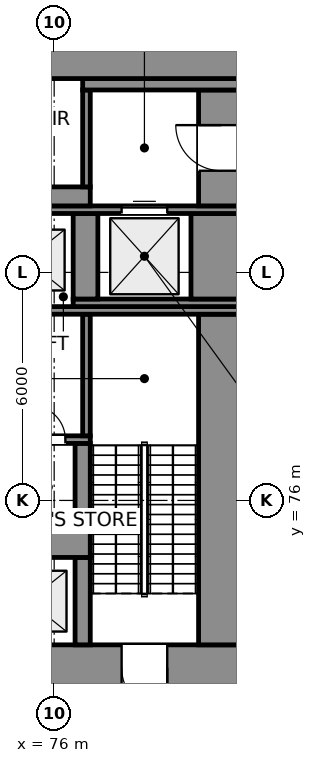
"""IFC4 building model, lengths in metres.
Left out: names, types, materials, properties, quantities, classifications, styles, units other than length and angle.
Written with IfcOpenShell. Run it as: python <this file> out.ifc"""

import sys

from ifc_helpers import new_model, si_unit, direction, frame, frame_2d, origin, place, context, subcontext, project, spatial, rectangle, extrude, element, fill, save


model = new_model("IFC4")
c1 = context("Model", 3, precision=1e-05, world=origin(), true_north=direction((0.0, 1.0)))
c2 = subcontext(c1, "Body", "Model", "MODEL_VIEW")
j1 = project(units=[si_unit("LENGTHUNIT", "METRE"), si_unit("PLANEANGLEUNIT", "RADIAN")], contexts=[c1])
p1 = place(None, origin())
s1 = spatial("IfcSite", under=j1, at=p1, CompositionType="ELEMENT")
p2 = place(p1, origin())
s2 = spatial("IfcBuilding", under=s1, at=p2, CompositionType="ELEMENT")
p3 = place(p2, frame((0.0, 0.0, 9.0)))
s3 = spatial("IfcBuildingStorey", under=s2, at=p3, CompositionType="ELEMENT", Elevation=9.0)
p4 = place(p3, frame((59.0, 71.6, 0.0), z_axis=(0.0, 0.0, 1.0), x_axis=(1.0, 0.0, 0.0)))
e1 = element("IfcWall", 1, at=p4, inside=s3, PredefinedType="SHEAR", context=c2, shape_type="SweptSolid", body=[
    extrude(rectangle(XDim=22.0, YDim=1.2, at=frame_2d((11.0, 0.0))), origin(), (0.0, 0.0, 1.0), 6.0),
])
p5 = place(p4, frame((2.025, 0.0, 0.0)))
e2 = element("IfcOpeningElement", 2, at=p5, cuts=e1, PredefinedType="OPENING", context=c2, shape_type="SweptSolid", body=[
    extrude(rectangle(XDim=1.2, YDim=2.1, at=frame_2d((0.6, 1.05))), frame((0.0, 0.61, 0.0), z_axis=(0.0, -1.0, 0.0), x_axis=(1.0, 0.0, 0.0)), (0.0, 0.0, 1.0), 1.22),
])
p6 = place(p4, frame((18.775, 0.0, 0.0)))
e3 = element("IfcOpeningElement", 3, at=p6, cuts=e1, PredefinedType="OPENING", context=c2, shape_type="SweptSolid", body=[
    extrude(rectangle(XDim=1.2, YDim=2.1, at=frame_2d((0.6, 1.05))), frame((0.0, 0.61, 0.0), z_axis=(0.0, -1.0, 0.0), x_axis=(1.0, 0.0, 0.0)), (0.0, 0.0, 1.0), 1.22),
])
p7 = place(p4, frame((10.0, 0.0, 0.0)))
e4 = element("IfcOpeningElement", 4, at=p7, cuts=e1, PredefinedType="OPENING", context=c2, shape_type="SweptSolid", body=[
    extrude(rectangle(XDim=2.0, YDim=2.1, at=frame_2d((1.0, 1.05))), frame((0.0, 0.61, 0.0), z_axis=(0.0, -1.0, 0.0), x_axis=(1.0, 0.0, 0.0)), (0.0, 0.0, 1.0), 1.22),
])
p8 = place(p4, frame((4.925, 0.0, 0.0)))
e5 = element("IfcOpeningElement", 5, at=p8, cuts=e1, PredefinedType="OPENING", context=c2, shape_type="SweptSolid", body=[
    extrude(rectangle(XDim=1.1, YDim=2.1, at=frame_2d((0.55, 1.05))), frame((0.0, 0.61, 0.0), z_axis=(0.0, -1.0, 0.0), x_axis=(1.0, 0.0, 0.0)), (0.0, 0.0, 1.0), 1.22),
])
p9 = place(p4, frame((7.575, 0.0, 0.0)))
e6 = element("IfcOpeningElement", 6, at=p9, cuts=e1, PredefinedType="OPENING", context=c2, shape_type="SweptSolid", body=[
    extrude(rectangle(XDim=1.1, YDim=2.1, at=frame_2d((0.55, 1.05))), frame((0.0, 0.61, 0.0), z_axis=(0.0, -1.0, 0.0), x_axis=(1.0, 0.0, 0.0)), (0.0, 0.0, 1.0), 1.22),
])
p10 = place(p4, frame((13.125, 0.0, 0.0)))
e7 = element("IfcOpeningElement", 7, at=p10, cuts=e1, PredefinedType="OPENING", context=c2, shape_type="SweptSolid", body=[
    extrude(rectangle(XDim=1.1, YDim=2.1, at=frame_2d((0.55, 1.05))), frame((0.0, 0.61, 0.0), z_axis=(0.0, -1.0, 0.0), x_axis=(1.0, 0.0, 0.0)), (0.0, 0.0, 1.0), 1.22),
])
p11 = place(p4, frame((15.775, 0.0, 0.0)))
e8 = element("IfcOpeningElement", 8, at=p11, cuts=e1, PredefinedType="OPENING", context=c2, shape_type="SweptSolid", body=[
    extrude(rectangle(XDim=1.1, YDim=2.1, at=frame_2d((0.55, 1.05))), frame((0.0, 0.61, 0.0), z_axis=(0.0, -1.0, 0.0), x_axis=(1.0, 0.0, 0.0)), (0.0, 0.0, 1.0), 1.22),
])
p12 = place(p3, frame((76.75, 72.2, 0.0), z_axis=(0.0, 0.0, 1.0), x_axis=(0.0, 1.0, 0.0)))
e9 = element("IfcWall", 9, at=p12, inside=s3, PredefinedType="SHEAR", context=c2, shape_type="SweptSolid", body=[
    extrude(rectangle(XDim=2.3, YDim=0.4, at=frame_2d((1.15, 0.0))), origin(), (0.0, 0.0, 1.0), 6.0),
])
p13 = place(p3, frame((80.4, 72.2, 0.0), z_axis=(0.0, 0.0, 1.0), x_axis=(0.0, 1.0, 0.0)))
e10 = element("IfcWall", 10, at=p13, inside=s3, PredefinedType="SHEAR", context=c2, shape_type="SweptSolid", body=[
    extrude(rectangle(XDim=8.7, YDim=1.2, at=frame_2d((4.35, 0.0))), origin(), (0.0, 0.0, 1.0), 6.0),
])
p14 = place(p3, frame((71.25, 74.85, 0.0), z_axis=(0.0, 0.0, 1.0), x_axis=(1.0, 0.0, 0.0)))
e11 = element("IfcWall", 11, at=p14, inside=s3, PredefinedType="SHEAR", context=c2, shape_type="SweptSolid", body=[
    extrude(rectangle(XDim=5.7, YDim=0.7, at=frame_2d((2.85, 0.0))), origin(), (0.0, 0.0, 1.0), 6.0),
])
p15 = place(p3, frame((76.75, 75.2, 0.0), z_axis=(0.0, 0.0, 1.0), x_axis=(0.0, 1.0, 0.0)))
e12 = element("IfcWall", 12, at=p15, inside=s3, PredefinedType="SHEAR", context=c2, shape_type="SweptSolid", body=[
    extrude(rectangle(XDim=2.3, YDim=0.4, at=frame_2d((1.15, 0.0))), origin(), (0.0, 0.0, 1.0), 6.0),
])
p16 = place(p3, frame((71.25, 77.6, 0.0), z_axis=(0.0, 0.0, 1.0), x_axis=(1.0, 0.0, 0.0)))
e13 = element("IfcWall", 13, at=p16, inside=s3, PredefinedType="SHEAR", context=c2, shape_type="SweptSolid", body=[
    extrude(rectangle(XDim=5.7, YDim=0.2, at=frame_2d((2.85, 0.0))), origin(), (0.0, 0.0, 1.0), 6.0),
])
p17 = place(p16, frame((0.455, 0.0, 0.0)))
e14 = element("IfcOpeningElement", 14, at=p17, cuts=e13, PredefinedType="OPENING", context=c2, shape_type="SweptSolid", body=[
    extrude(rectangle(XDim=0.9, YDim=2.1, at=frame_2d((0.45, 1.05))), frame((0.0, 0.11, 0.0), z_axis=(0.0, -1.0, 0.0), x_axis=(1.0, 0.0, 0.0)), (0.0, 0.0, 1.0), 0.22),
])
p18 = place(p16, frame((2.3, 0.0, 0.0)))
e15 = element("IfcOpeningElement", 15, at=p18, cuts=e13, PredefinedType="OPENING", context=c2, shape_type="SweptSolid", body=[
    extrude(rectangle(XDim=0.9, YDim=2.1, at=frame_2d((0.45, 1.05))), frame((0.0, 0.11, 0.0), z_axis=(0.0, -1.0, 0.0), x_axis=(1.0, 0.0, 0.0)), (0.0, 0.0, 1.0), 0.22),
])
p19 = place(p16, frame((4.145, 0.0, 0.0)))
e16 = element("IfcOpeningElement", 16, at=p19, cuts=e13, PredefinedType="OPENING", context=c2, shape_type="SweptSolid", body=[
    extrude(rectangle(XDim=0.9, YDim=2.1, at=frame_2d((0.45, 1.05))), frame((0.0, 0.11, 0.0), z_axis=(0.0, -1.0, 0.0), x_axis=(1.0, 0.0, 0.0)), (0.0, 0.0, 1.0), 0.22),
])
p20 = place(p3, frame((76.85, 77.7, 0.0), z_axis=(0.0, 0.0, 1.0), x_axis=(0.0, 1.0, 0.0)))
e17 = element("IfcWall", 17, at=p20, inside=s3, PredefinedType="SHEAR", context=c2, shape_type="SweptSolid", body=[
    extrude(rectangle(XDim=3.2, YDim=0.2, at=frame_2d((1.6, 0.0))), origin(), (0.0, 0.0, 1.0), 6.0),
])
p21 = place(p3, frame((59.0, 81.0, 0.0), z_axis=(0.0, 0.0, 1.0), x_axis=(1.0, 0.0, 0.0)))
e18 = element("IfcWall", 18, at=p21, inside=s3, PredefinedType="SHEAR", context=c2, shape_type="SweptSolid", body=[
    extrude(rectangle(XDim=22.0, YDim=0.2, at=frame_2d((11.0, 0.0))), origin(), (0.0, 0.0, 1.0), 6.0),
])
p22 = place(p21, frame((15.725, 0.0, 0.0)))
e19 = element("IfcOpeningElement", 19, at=p22, cuts=e18, PredefinedType="OPENING", context=c2, shape_type="SweptSolid", body=[
    extrude(rectangle(XDim=1.1, YDim=2.1, at=frame_2d((0.55, 1.05))), frame((0.0, 0.11, 0.0), z_axis=(0.0, -1.0, 0.0), x_axis=(1.0, 0.0, 0.0)), (0.0, 0.0, 1.0), 0.22),
])
p23 = place(p3, frame((76.5, 81.2, 0.0), z_axis=(0.0, 0.0, 1.0), x_axis=(1.0, 0.0, 0.0)))
e20 = element("IfcWall", 20, at=p23, inside=s3, PredefinedType="SHEAR", context=c2, shape_type="SweptSolid", body=[
    extrude(rectangle(XDim=4.5, YDim=0.2, at=frame_2d((2.25, 0.0))), origin(), (0.0, 0.0, 1.0), 6.0),
])
p24 = place(p3, frame((76.825, 81.3, 0.0), z_axis=(0.0, 0.0, 1.0), x_axis=(0.0, 1.0, 0.0)))
e21 = element("IfcWall", 21, at=p24, inside=s3, PredefinedType="SHEAR", context=c2, shape_type="SweptSolid", body=[
    extrude(rectangle(XDim=2.25, YDim=0.65, at=frame_2d((1.125, 0.0))), origin(), (0.0, 0.0, 1.0), 6.0),
])
p25 = place(p3, frame((80.3, 81.3, 0.0), z_axis=(0.0, 0.0, 1.0), x_axis=(0.0, 1.0, 0.0)))
e22 = element("IfcWall", 22, at=p25, inside=s3, PredefinedType="SHEAR", context=c2, shape_type="SweptSolid", body=[
    extrude(rectangle(XDim=2.25, YDim=1.4, at=frame_2d((1.125, 0.0))), origin(), (0.0, 0.0, 1.0), 6.0),
])
p26 = place(p3, frame((59.0, 83.65, 0.0), z_axis=(0.0, 0.0, 1.0), x_axis=(1.0, 0.0, 0.0)))
e23 = element("IfcWall", 23, at=p26, inside=s3, PredefinedType="SHEAR", context=c2, shape_type="SweptSolid", body=[
    extrude(rectangle(XDim=22.0, YDim=0.2, at=frame_2d((11.0, 0.0))), origin(), (0.0, 0.0, 1.0), 6.0),
])
p27 = place(p26, frame((5.125, 0.0, 0.0)))
e24 = element("IfcOpeningElement", 24, at=p27, cuts=e23, PredefinedType="OPENING", context=c2, shape_type="SweptSolid", body=[
    extrude(rectangle(XDim=1.1, YDim=2.1, at=frame_2d((0.55, 1.05))), frame((0.0, 0.11, 0.0), z_axis=(0.0, -1.0, 0.0), x_axis=(1.0, 0.0, 0.0)), (0.0, 0.0, 1.0), 0.22),
])
p28 = place(p26, frame((7.65, 0.0, 0.0)))
e25 = element("IfcOpeningElement", 25, at=p28, cuts=e23, PredefinedType="OPENING", context=c2, shape_type="SweptSolid", body=[
    extrude(rectangle(XDim=1.1, YDim=2.1, at=frame_2d((0.55, 1.05))), frame((0.0, 0.11, 0.0), z_axis=(0.0, -1.0, 0.0), x_axis=(1.0, 0.0, 0.0)), (0.0, 0.0, 1.0), 0.22),
])
p29 = place(p26, frame((18.775, 0.0, 0.0)))
e26 = element("IfcOpeningElement", 26, at=p29, cuts=e23, PredefinedType="OPENING", context=c2, shape_type="SweptSolid", body=[
    extrude(rectangle(XDim=1.2, YDim=2.1, at=frame_2d((0.6, 1.05))), frame((0.0, 0.11, 0.0), z_axis=(0.0, -1.0, 0.0), x_axis=(1.0, 0.0, 0.0)), (0.0, 0.0, 1.0), 0.22),
])
p30 = place(p26, frame((2.075, 0.0, 0.0)))
e27 = element("IfcOpeningElement", 27, at=p30, cuts=e23, PredefinedType="OPENING", context=c2, shape_type="SweptSolid", body=[
    extrude(rectangle(XDim=1.1, YDim=2.1, at=frame_2d((0.55, 1.05))), frame((0.0, 0.11, 0.0), z_axis=(0.0, -1.0, 0.0), x_axis=(1.0, 0.0, 0.0)), (0.0, 0.0, 1.0), 0.22),
])
p31 = place(p3, frame((67.85, 84.0, 0.0), z_axis=(0.0, 0.0, 1.0), x_axis=(1.0, 0.0, 0.0)))
e28 = element("IfcWall", 28, at=p31, inside=s3, PredefinedType="SHEAR", context=c2, shape_type="SweptSolid", body=[
    extrude(rectangle(XDim=9.1, YDim=0.5, at=frame_2d((4.55, 0.0))), origin(), (0.0, 0.0, 1.0), 6.0),
])
p32 = place(p3, frame((80.4, 83.75, 0.0), z_axis=(0.0, 0.0, 1.0), x_axis=(0.0, 1.0, 0.0)))
e29 = element("IfcWall", 29, at=p32, inside=s3, PredefinedType="SHEAR", context=c2, shape_type="SweptSolid", body=[
    extrude(rectangle(XDim=3.05, YDim=1.2, at=frame_2d((1.525, 0.0))), origin(), (0.0, 0.0, 1.0), 6.0),
])
p33 = place(p32, frame((0.925, 0.0, 0.0)))
e30 = element("IfcOpeningElement", 30, at=p33, cuts=e29, PredefinedType="OPENING", context=c2, shape_type="SweptSolid", body=[
    extrude(rectangle(XDim=1.2, YDim=2.1, at=frame_2d((0.6, 1.05))), frame((0.0, 0.61, 0.0), z_axis=(0.0, -1.0, 0.0), x_axis=(1.0, 0.0, 0.0)), (0.0, 0.0, 1.0), 1.22),
])
p34 = place(p3, frame((76.85, 84.25, 0.0), z_axis=(0.0, 0.0, 1.0), x_axis=(0.0, 1.0, 0.0)))
e31 = element("IfcWall", 31, at=p34, inside=s3, PredefinedType="SHEAR", context=c2, shape_type="SweptSolid", body=[
    extrude(rectangle(XDim=2.55, YDim=0.2, at=frame_2d((1.275, 0.0))), origin(), (0.0, 0.0, 1.0), 6.0),
])
p35 = place(p3, frame((76.75, 86.95, 0.0), z_axis=(0.0, 0.0, 1.0), x_axis=(1.0, 0.0, 0.0)))
e32 = element("IfcWall", 32, at=p35, inside=s3, PredefinedType="SHEAR", context=c2, shape_type="SweptSolid", body=[
    extrude(rectangle(XDim=4.25, YDim=0.3, at=frame_2d((2.125, 0.0))), origin(), (0.0, 0.0, 1.0), 6.0),
])
p36 = place(p3, frame((59.0, 87.55, 0.0), z_axis=(0.0, 0.0, 1.0), x_axis=(1.0, 0.0, 0.0)))
e33 = element("IfcWall", 33, at=p36, inside=s3, PredefinedType="SHEAR", context=c2, shape_type="SweptSolid", body=[
    extrude(rectangle(XDim=22.0, YDim=0.9, at=frame_2d((11.0, 0.0))), origin(), (0.0, 0.0, 1.0), 6.0),
])
p37 = place(p6, frame((1.2, 0.0, 0.0), z_axis=(0.0, 0.0, 1.0), x_axis=(-1.0, 0.0, 0.0)))
e34 = element("IfcDoor", 34, at=p37, inside=s3, OperationType="SINGLE_SWING_LEFT", PredefinedType="DOOR", context=c2, shape_type="SweptSolid", body=[
    extrude(rectangle(XDim=1.2, YDim=2.1, at=frame_2d((0.6, 1.05))), frame((0.0, 0.025, 0.0), z_axis=(0.0, -1.0, 0.0), x_axis=(1.0, 0.0, 0.0)), (0.0, 0.0, 1.0), 0.05),
])
fill(e3, e34)
p38 = place(p33, origin())
e35 = element("IfcDoor", 35, at=p38, inside=s3, OperationType="SINGLE_SWING_RIGHT", PredefinedType="DOOR", context=c2, shape_type="SweptSolid", body=[
    extrude(rectangle(XDim=1.2, YDim=2.1, at=frame_2d((0.6, 1.05))), frame((0.0, 0.025, 0.0), z_axis=(0.0, -1.0, 0.0), x_axis=(1.0, 0.0, 0.0)), (0.0, 0.0, 1.0), 0.05),
])
fill(e30, e35)
p39 = place(p29, origin())
e36 = element("IfcDoor", 36, at=p39, inside=s3, OperationType="DOUBLE_DOOR_SLIDING", PredefinedType="DOOR", context=c2, shape_type="SweptSolid", body=[
    extrude(rectangle(XDim=1.2, YDim=2.1, at=frame_2d((0.6, 1.05))), frame((0.0, 0.025, 0.0), z_axis=(0.0, -1.0, 0.0), x_axis=(1.0, 0.0, 0.0)), (0.0, 0.0, 1.0), 0.05),
])
fill(e26, e36)
p40 = place(p19, origin())
e37 = element("IfcDoor", 37, at=p40, inside=s3, OperationType="SINGLE_SWING_LEFT", PredefinedType="DOOR", context=c2, shape_type="SweptSolid", body=[
    extrude(rectangle(XDim=0.9, YDim=2.1, at=frame_2d((0.45, 1.05))), frame((0.0, 0.025, 0.0), z_axis=(0.0, -1.0, 0.0), x_axis=(1.0, 0.0, 0.0)), (0.0, 0.0, 1.0), 0.05),
])
fill(e16, e37)
save(model, sys.argv[1])
